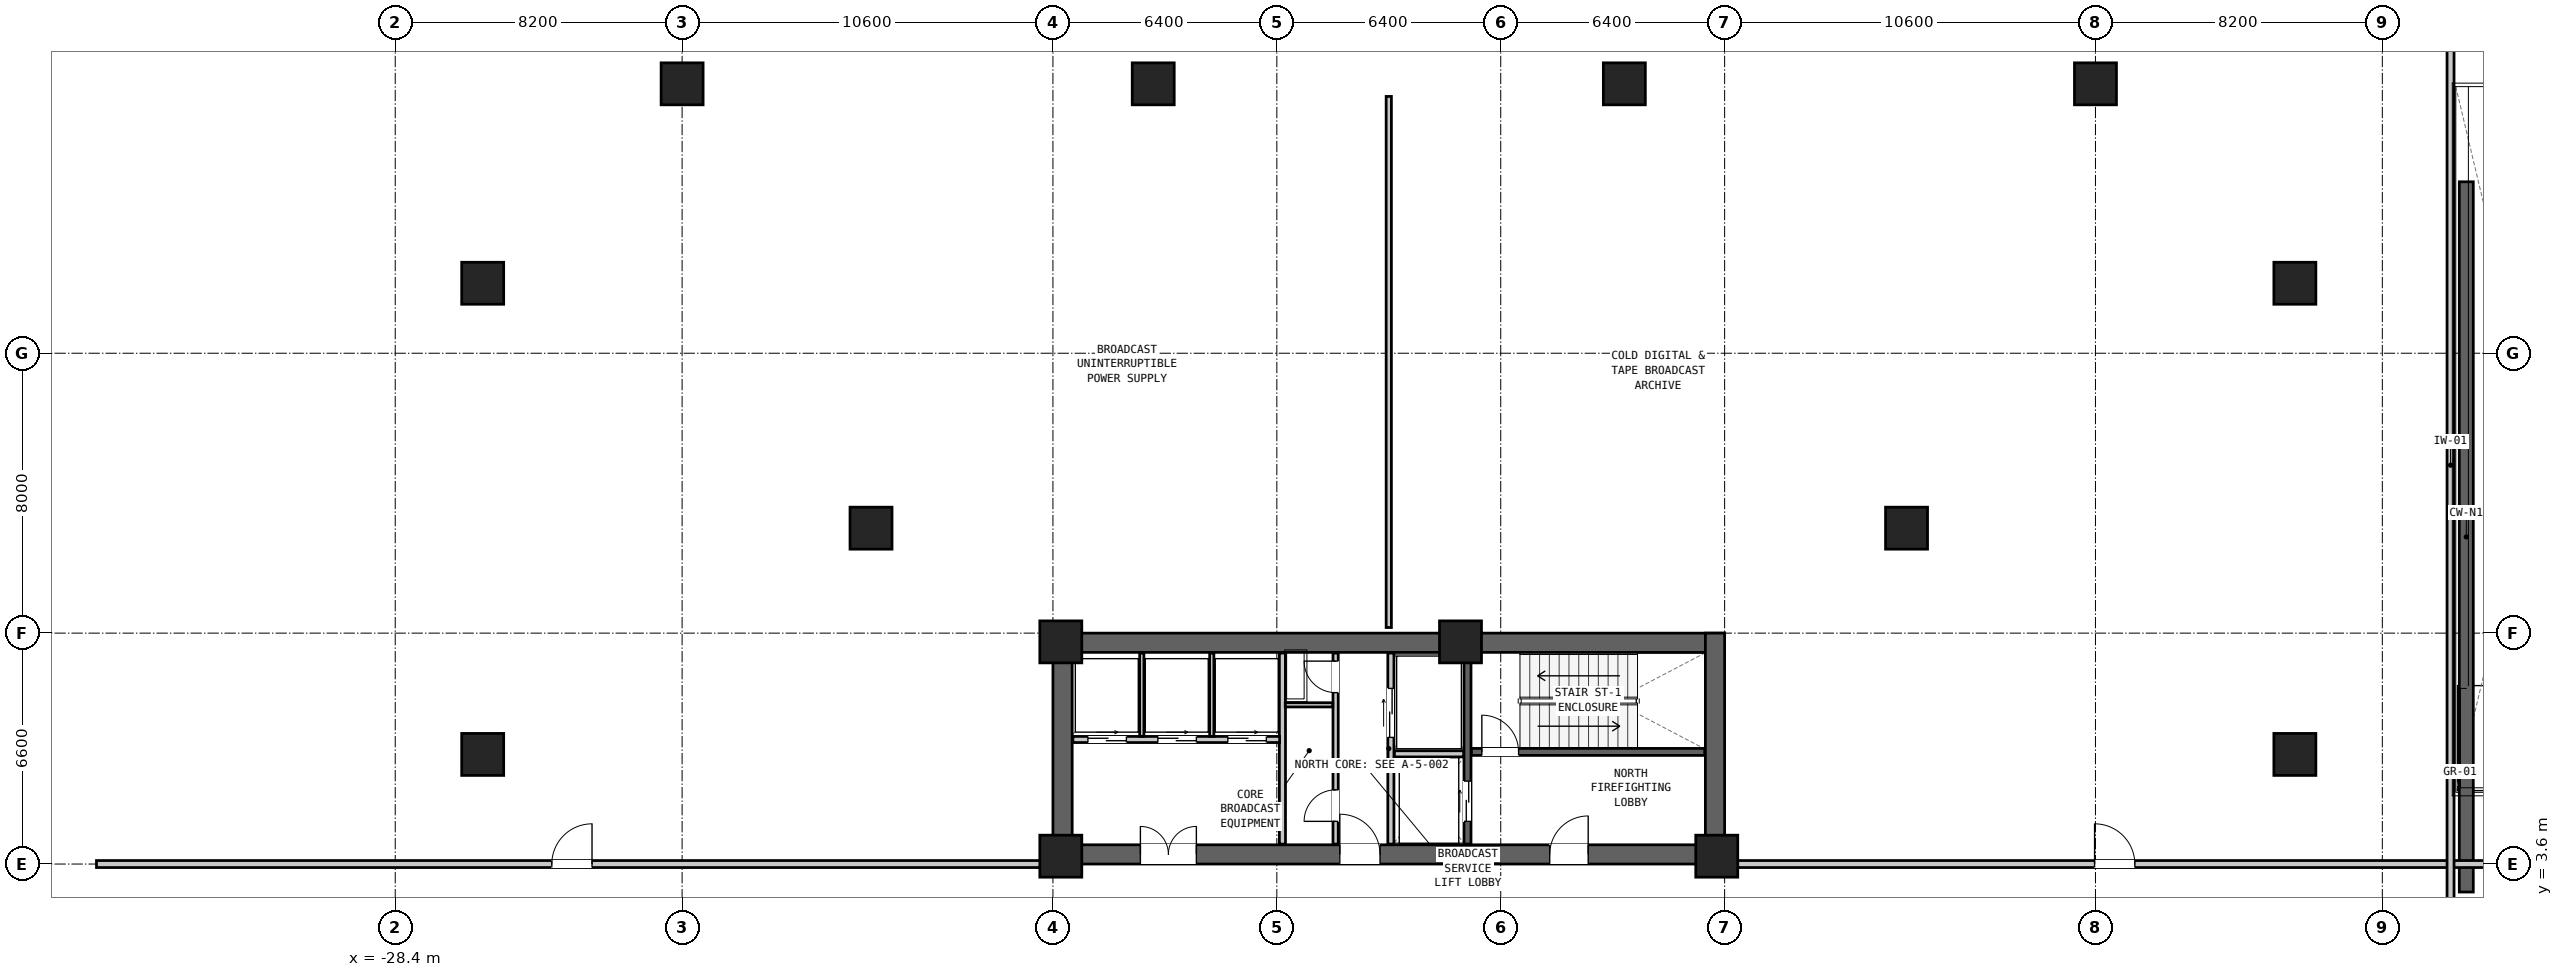
"""IFC4 building model, lengths in metres.
Left out: names, types, materials, properties, quantities, classifications, styles, units other than length and angle.
Written with IfcOpenShell. Run it as: python <this file> out.ifc"""

import sys

from ifc_helpers import new_model, si_unit, direction, frame, frame_2d, origin, origin_2d, place, context, subcontext, project, spatial, rectangle, extrude, element, fill, save


model = new_model("IFC4")
c1 = context("Model", 3, precision=1e-05, world=origin(), true_north=direction((0.0, 1.0)))
c2 = subcontext(c1, "Body", "Model", "MODEL_VIEW")
j1 = project(units=[si_unit("LENGTHUNIT", "METRE"), si_unit("PLANEANGLEUNIT", "RADIAN")], contexts=[c1])
p1 = place(None, origin())
s1 = spatial("IfcSite", under=j1, at=p1, CompositionType="ELEMENT")
p2 = place(p1, origin())
s2 = spatial("IfcBuilding", under=s1, at=p2, CompositionType="ELEMENT")
p3 = place(p2, frame((0.0, 0.0, -4.5)))
s3 = spatial("IfcBuildingStorey", under=s2, at=p3, CompositionType="ELEMENT", Elevation=-4.5)
p4 = place(p3, frame((-9.6, 9.925, 0.0), z_axis=(0.0, 0.0, 1.0), x_axis=(1.0, 0.0, 0.0)))
e1 = element("IfcWall", 1, at=p4, inside=s3, PredefinedType="SHEAR", context=c2, shape_type="SweptSolid", body=[
    extrude(rectangle(XDim=19.2, YDim=0.55, at=frame_2d((9.6, 0.0))), origin(), (0.0, 0.0, 1.0), 4.5),
])
p5 = place(p3, frame((-9.6, 3.875, 0.0), z_axis=(0.0, 0.0, 1.0), x_axis=(1.0, 0.0, 0.0)))
e2 = element("IfcWall", 2, at=p5, inside=s3, PredefinedType="SHEAR", context=c2, shape_type="SweptSolid", body=[
    extrude(rectangle(XDim=19.2, YDim=0.55, at=frame_2d((9.6, 0.0))), origin(), (0.0, 0.0, 1.0), 4.5),
])
p6 = place(p5, frame((14.2, 0.0, 0.0)))
e3 = element("IfcOpeningElement", 3, at=p6, cuts=e2, PredefinedType="OPENING", context=c2, shape_type="SweptSolid", body=[
    extrude(rectangle(XDim=1.1, YDim=2.08, at=frame_2d((0.55, 1.04))), frame((0.0, 0.287, 0.0), z_axis=(0.0, -1.0, 0.0), x_axis=(1.0, 0.0, 0.0)), (0.0, 0.0, 1.0), 0.574),
])
p7 = place(p5, frame((8.2, 0.0, 0.0)))
e4 = element("IfcOpeningElement", 4, at=p7, cuts=e2, PredefinedType="OPENING", context=c2, shape_type="SweptSolid", body=[
    extrude(rectangle(XDim=1.15, YDim=2.1, at=frame_2d((0.575, 1.05))), frame((0.0, 0.287, 0.0), z_axis=(0.0, -1.0, 0.0), x_axis=(1.0, 0.0, 0.0)), (0.0, 0.0, 1.0), 0.574),
])
p8 = place(p5, frame((2.5, 0.0, 0.0)))
e5 = element("IfcOpeningElement", 5, at=p8, cuts=e2, PredefinedType="OPENING", context=c2, shape_type="SweptSolid", body=[
    extrude(rectangle(XDim=1.6, YDim=2.12, at=frame_2d((0.8, 1.06))), frame((0.0, 0.287, 0.0), z_axis=(0.0, -1.0, 0.0), x_axis=(1.0, 0.0, 0.0)), (0.0, 0.0, 1.0), 0.574),
])
for number, where, z_axis, x_axis in (
    (6, (-9.325, 3.6, 0.0), (0.0, 0.0, 1.0), (0.0, 1.0, 0.0)),
    (7, (9.325, 3.6, 0.0), (0.0, 0.0, 1.0), (0.0, 1.0, 0.0)),
):
    element("IfcWall", number, at=place(p3, frame(where, z_axis=z_axis, x_axis=x_axis)), inside=s3, PredefinedType="SHEAR", context=c2, shape_type="SweptSolid", body=[
        extrude(rectangle(XDim=6.6, YDim=0.55, at=frame_2d((3.3, 0.0))), origin(), (0.0, 0.0, 1.0), 4.5),
    ])
for number, where, z_axis, x_axis in (
    (8, (-14.8, 13.2, 0.0), (0.0, 0.0, 1.0), (1.0, 0.0, 0.0)),
    (9, (14.8, 13.2, 0.0), (0.0, 0.0, 1.0), (1.0, 0.0, 0.0)),
    (10, (25.9, 6.733, 0.0), (0.0, 0.0, 1.0), (0.0, 1.0, 0.0)),
    (11, (25.9, 20.2, 0.0), (0.0, 0.0, 1.0), (0.0, 1.0, 0.0)),
    (12, (20.2, 25.9, 0.0), (0.0, 0.0, 1.0), (1.0, 0.0, 0.0)),
    (13, (6.733, 25.9, 0.0), (0.0, 0.0, 1.0), (1.0, 0.0, 0.0)),
    (14, (-6.733, 25.9, 0.0), (0.0, 0.0, 1.0), (1.0, 0.0, 0.0)),
    (15, (-20.2, 25.9, 0.0), (0.0, 0.0, 1.0), (1.0, 0.0, 0.0)),
    (16, (-25.9, 20.2, 0.0), (0.0, 0.0, 1.0), (0.0, 1.0, 0.0)),
    (17, (-25.9, 6.733, 0.0), (0.0, 0.0, 1.0), (0.0, 1.0, 0.0)),
    (18, (-9.375, 9.95, 0.0), (0.0, 0.0, 1.0), (1.0, 0.0, 0.0)),
    (19, (2.05, 9.95, 0.0), (0.0, 0.0, 1.0), (1.0, 0.0, 0.0)),
    (20, (-9.375, 3.825, 0.0), (0.0, 0.0, 1.0), (1.0, 0.0, 0.0)),
    (21, (9.375, 3.825, 0.0), (0.0, 0.0, 1.0), (1.0, 0.0, 0.0)),
):
    element("IfcColumn", number, at=place(p3, frame(where, z_axis=z_axis, x_axis=x_axis)), inside=s3, PredefinedType="COLUMN", context=c2, shape_type="SweptSolid", body=[
        extrude(rectangle(XDim=1.2, YDim=1.2, at=origin_2d()), origin(), (0.0, 0.0, 1.0), 4.5),
    ])
p9 = place(p3, frame((30.8, 2.8, 0.0), z_axis=(0.0, 0.0, 1.0), x_axis=(0.0, 1.0, 0.0)))
e22 = element("IfcWall", 22, at=p9, inside=s3, PredefinedType="SHEAR", context=c2, shape_type="SweptSolid", body=[
    extrude(rectangle(XDim=20.3, YDim=0.4, at=frame_2d((10.15, 0.0))), origin(), (0.0, 0.0, 1.0), 4.18),
])
p10 = place(p3, frame((2.36, 6.805, 0.0), z_axis=(0.0, 0.0, 1.0), x_axis=(1.0, 0.0, 0.0)))
e23 = element("IfcWall", 23, at=p10, inside=s3, PredefinedType="SHEAR", context=c2, shape_type="SweptSolid", body=[
    extrude(rectangle(XDim=6.67, YDim=0.2, at=frame_2d((3.335, 0.0))), origin(), (0.0, 0.0, 1.0), 4.18),
])
p11 = place(p10, frame((0.3, 0.0, 0.0)))
e24 = element("IfcOpeningElement", 24, at=p11, cuts=e23, PredefinedType="OPENING", context=c2, shape_type="SweptSolid", body=[
    extrude(rectangle(XDim=1.05, YDim=2.08, at=frame_2d((0.525, 1.04))), frame((0.0, 0.112, 0.0), z_axis=(0.0, -1.0, 0.0), x_axis=(1.0, 0.0, 0.0)), (0.0, 0.0, 1.0), 0.224),
])
p12 = place(p3, frame((2.25, 4.17, 0.0), z_axis=(0.0, 0.0, 1.0), x_axis=(0.0, 1.0, 0.0)))
e25 = element("IfcWall", 25, at=p12, inside=s3, PredefinedType="SHEAR", context=c2, shape_type="SweptSolid", body=[
    extrude(rectangle(XDim=5.46, YDim=0.2, at=frame_2d((2.73, 0.0))), origin(), (0.0, 0.0, 1.0), 4.18),
])
p13 = place(p12, frame((0.65, 0.0, 0.0)))
e26 = element("IfcOpeningElement", 26, at=p13, cuts=e25, PredefinedType="OPENING", context=c2, shape_type="SweptSolid", body=[
    extrude(rectangle(XDim=1.15, YDim=2.08, at=frame_2d((0.575, 1.04))), frame((0.0, 0.112, 0.0), z_axis=(0.0, -1.0, 0.0), x_axis=(1.0, 0.0, 0.0)), (0.0, 0.0, 1.0), 0.224),
])
p14 = place(p3, frame((0.06, 4.17, 0.0), z_axis=(0.0, 0.0, 1.0), x_axis=(0.0, 1.0, 0.0)))
e27 = element("IfcWall", 27, at=p14, inside=s3, PredefinedType="PARTITIONING", context=c2, shape_type="SweptSolid", body=[
    extrude(rectangle(XDim=5.46, YDim=0.175, at=frame_2d((2.73, 0.0))), origin(), (0.0, 0.0, 1.0), 4.18),
])
p15 = place(p14, frame((3.05, 0.0, 0.0)))
e28 = element("IfcOpeningElement", 28, at=p15, cuts=e27, PredefinedType="OPENING", context=c2, shape_type="SweptSolid", body=[
    extrude(rectangle(XDim=1.4, YDim=2.12, at=frame_2d((0.7, 1.06))), frame((0.0, 0.1, 0.0), z_axis=(0.0, -1.0, 0.0), x_axis=(1.0, 0.0, 0.0)), (0.0, 0.0, 1.0), 0.199),
])
p16 = place(p3, frame((0.16, 6.75, 0.0), z_axis=(0.0, 0.0, 1.0), x_axis=(1.0, 0.0, 0.0)))
e29 = element("IfcWall", 29, at=p16, inside=s3, PredefinedType="PARTITIONING", context=c2, shape_type="SweptSolid", body=[
    extrude(rectangle(XDim=1.98, YDim=0.175, at=frame_2d((0.99, 0.0))), origin(), (0.0, 0.0, 1.0), 4.18),
])
p17 = place(p3, frame((-3.04, 4.17, 0.0), z_axis=(0.0, 0.0, 1.0), x_axis=(0.0, 1.0, 0.0)))
e30 = element("IfcWall", 30, at=p17, inside=s3, PredefinedType="PARTITIONING", context=c2, shape_type="SweptSolid", body=[
    extrude(rectangle(XDim=5.46, YDim=0.175, at=frame_2d((2.73, 0.0))), origin(), (0.0, 0.0, 1.0), 4.18),
])
p18 = place(p3, frame((-1.52, 4.17, 0.0), z_axis=(0.0, 0.0, 1.0), x_axis=(0.0, 1.0, 0.0)))
e31 = element("IfcWall", 31, at=p18, inside=s3, PredefinedType="PARTITIONING", context=c2, shape_type="SweptSolid", body=[
    extrude(rectangle(XDim=5.46, YDim=0.15, at=frame_2d((2.73, 0.0))), origin(), (0.0, 0.0, 1.0), 4.18),
])
p19 = place(p18, frame((4.33, 0.0, 0.0)))
e32 = element("IfcOpeningElement", 32, at=p19, cuts=e31, PredefinedType="OPENING", context=c2, shape_type="SweptSolid", body=[
    extrude(rectangle(XDim=0.9, YDim=2.05, at=frame_2d((0.45, 1.025))), frame((0.0, 0.087, 0.0), z_axis=(0.0, -1.0, 0.0), x_axis=(1.0, 0.0, 0.0)), (0.0, 0.0, 1.0), 0.174),
])
p20 = place(p18, frame((0.65, 0.0, 0.0)))
e33 = element("IfcOpeningElement", 33, at=p20, cuts=e31, PredefinedType="OPENING", context=c2, shape_type="SweptSolid", body=[
    extrude(rectangle(XDim=0.9, YDim=2.05, at=frame_2d((0.45, 1.025))), frame((0.0, 0.087, 0.0), z_axis=(0.0, -1.0, 0.0), x_axis=(1.0, 0.0, 0.0)), (0.0, 0.0, 1.0), 0.174),
])
p21 = place(p3, frame((-2.96, 8.15, 0.0), z_axis=(0.0, 0.0, 1.0), x_axis=(1.0, 0.0, 0.0)))
e34 = element("IfcWall", 34, at=p21, inside=s3, PredefinedType="PARTITIONING", context=c2, shape_type="SweptSolid", body=[
    extrude(rectangle(XDim=1.36, YDim=0.12, at=frame_2d((0.68, 0.0))), origin(), (0.0, 0.0, 1.0), 4.18),
])
p22 = place(p3, frame((-9.03, 7.16, 0.0), z_axis=(0.0, 0.0, 1.0), x_axis=(1.0, 0.0, 0.0)))
e35 = element("IfcWall", 35, at=p22, inside=s3, PredefinedType="PARTITIONING", context=c2, shape_type="SweptSolid", body=[
    extrude(rectangle(XDim=5.91, YDim=0.175, at=frame_2d((2.955, 0.0))), origin(), (0.0, 0.0, 1.0), 4.18),
])
p23 = place(p22, frame((0.43, 0.0, 0.0)))
e36 = element("IfcOpeningElement", 36, at=p23, cuts=e35, PredefinedType="OPENING", context=c2, shape_type="SweptSolid", body=[
    extrude(rectangle(XDim=1.1, YDim=2.06, at=frame_2d((0.55, 1.03))), frame((0.0, 0.1, 0.0), z_axis=(0.0, -1.0, 0.0), x_axis=(1.0, 0.0, 0.0)), (0.0, 0.0, 1.0), 0.199),
])
p24 = place(p22, frame((2.43, 0.0, 0.0)))
e37 = element("IfcOpeningElement", 37, at=p24, cuts=e35, PredefinedType="OPENING", context=c2, shape_type="SweptSolid", body=[
    extrude(rectangle(XDim=1.1, YDim=2.06, at=frame_2d((0.55, 1.03))), frame((0.0, 0.1, 0.0), z_axis=(0.0, -1.0, 0.0), x_axis=(1.0, 0.0, 0.0)), (0.0, 0.0, 1.0), 0.199),
])
p25 = place(p22, frame((4.43, 0.0, 0.0)))
e38 = element("IfcOpeningElement", 38, at=p25, cuts=e35, PredefinedType="OPENING", context=c2, shape_type="SweptSolid", body=[
    extrude(rectangle(XDim=1.1, YDim=2.06, at=frame_2d((0.55, 1.03))), frame((0.0, 0.1, 0.0), z_axis=(0.0, -1.0, 0.0), x_axis=(1.0, 0.0, 0.0)), (0.0, 0.0, 1.0), 0.199),
])
for number, where, z_axis, x_axis in (
    (39, (-7.06, 7.25, 0.0), (0.0, 0.0, 1.0), (0.0, 1.0, 0.0)),
    (40, (-5.06, 7.25, 0.0), (0.0, 0.0, 1.0), (0.0, 1.0, 0.0)),
):
    element("IfcWall", number, at=place(p3, frame(where, z_axis=z_axis, x_axis=x_axis)), inside=s3, PredefinedType="PARTITIONING", context=c2, shape_type="SweptSolid", body=[
        extrude(rectangle(XDim=2.38, YDim=0.12, at=frame_2d((1.19, 0.0))), origin(), (0.0, 0.0, 1.0), 4.18),
    ])
p26 = place(p3, frame((-36.94, 3.6, 0.0), z_axis=(0.0, 0.0, 1.0), x_axis=(1.0, 0.0, 0.0)))
e41 = element("IfcWall", 41, at=p26, inside=s3, PredefinedType="PARTITIONING", context=c2, shape_type="SweptSolid", body=[
    extrude(rectangle(XDim=27.18, YDim=0.2, at=frame_2d((13.59, 0.0))), origin(), (0.0, 0.0, 1.0), 3.042),
])
p27 = place(p26, frame((13.015, 0.0, 0.0)))
e42 = element("IfcOpeningElement", 42, at=p27, cuts=e41, PredefinedType="OPENING", context=c2, shape_type="SweptSolid", body=[
    extrude(rectangle(XDim=1.15, YDim=2.1, at=frame_2d((0.575, 1.05))), frame((0.0, 0.112, 0.0), z_axis=(0.0, -1.0, 0.0), x_axis=(1.0, 0.0, 0.0)), (0.0, 0.0, 1.0), 0.224),
])
p28 = place(p3, frame((9.76, 3.6, 0.0), z_axis=(0.0, 0.0, 1.0), x_axis=(1.0, 0.0, 0.0)))
e43 = element("IfcWall", 43, at=p28, inside=s3, PredefinedType="PARTITIONING", context=c2, shape_type="SweptSolid", body=[
    extrude(rectangle(XDim=21.98, YDim=0.2, at=frame_2d((10.99, 0.0))), origin(), (0.0, 0.0, 1.0), 3.042),
])
p29 = place(p28, frame((10.415, 0.0, 0.0)))
e44 = element("IfcOpeningElement", 44, at=p29, cuts=e43, PredefinedType="OPENING", context=c2, shape_type="SweptSolid", body=[
    extrude(rectangle(XDim=1.15, YDim=2.1, at=frame_2d((0.575, 1.05))), frame((0.0, 0.112, 0.0), z_axis=(0.0, -1.0, 0.0), x_axis=(1.0, 0.0, 0.0)), (0.0, 0.0, 1.0), 0.224),
])
p30 = place(p3, frame((0.0, 10.36, 0.0), z_axis=(0.0, 0.0, 1.0), x_axis=(0.0, 1.0, 0.0)))
e45 = element("IfcWall", 45, at=p30, inside=s3, PredefinedType="PARTITIONING", context=c2, shape_type="SweptSolid", body=[
    extrude(rectangle(XDim=15.18, YDim=0.15, at=frame_2d((7.59, 0.0))), origin(), (0.0, 0.0, 1.0), 3.553),
])
p31 = place(p3, frame((30.35, 2.56, 0.0), z_axis=(0.0, 0.0, 1.0), x_axis=(0.0, 1.0, 0.0)))
e46 = element("IfcWall", 46, at=p31, inside=s3, PredefinedType="PARTITIONING", context=c2, shape_type="SweptSolid", body=[
    extrude(rectangle(XDim=24.88, YDim=0.2, at=frame_2d((12.44, 0.0))), origin(), (0.0, 0.0, 1.0), 4.18),
])
p32 = place(p11, origin())
e47 = element("IfcDoor", 47, at=p32, inside=s3, OperationType="SINGLE_SWING_LEFT", PredefinedType="DOOR", context=c2, shape_type="SweptSolid", body=[
    extrude(rectangle(XDim=1.05, YDim=2.08, at=frame_2d((0.525, 1.04))), frame((0.0, 0.025, 0.0), z_axis=(0.0, -1.0, 0.0), x_axis=(1.0, 0.0, 0.0)), (0.0, 0.0, 1.0), 0.05),
])
fill(e24, e47)
p33 = place(p6, origin())
e48 = element("IfcDoor", 48, at=p33, inside=s3, OperationType="SINGLE_SWING_RIGHT", PredefinedType="DOOR", context=c2, shape_type="SweptSolid", body=[
    extrude(rectangle(XDim=1.1, YDim=2.08, at=frame_2d((0.55, 1.04))), frame((0.0, 0.025, 0.0), z_axis=(0.0, -1.0, 0.0), x_axis=(1.0, 0.0, 0.0)), (0.0, 0.0, 1.0), 0.05),
])
fill(e3, e48)
p34 = place(p13, origin())
e49 = element("IfcDoor", 49, at=p34, inside=s3, OperationType="DOUBLE_DOOR_SLIDING", PredefinedType="DOOR", context=c2, shape_type="SweptSolid", body=[
    extrude(rectangle(XDim=1.15, YDim=2.08, at=frame_2d((0.575, 1.04))), frame((0.0, 0.025, 0.0), z_axis=(0.0, -1.0, 0.0), x_axis=(1.0, 0.0, 0.0)), (0.0, 0.0, 1.0), 0.05),
])
fill(e26, e49)
p35 = place(p15, origin())
e50 = element("IfcDoor", 50, at=p35, inside=s3, OperationType="DOUBLE_DOOR_SLIDING", PredefinedType="DOOR", context=c2, shape_type="SweptSolid", body=[
    extrude(rectangle(XDim=1.4, YDim=2.12, at=frame_2d((0.7, 1.06))), frame((0.0, 0.025, 0.0), z_axis=(0.0, -1.0, 0.0), x_axis=(1.0, 0.0, 0.0)), (0.0, 0.0, 1.0), 0.05),
])
fill(e28, e50)
p36 = place(p7, origin())
e51 = element("IfcDoor", 51, at=p36, inside=s3, OperationType="SINGLE_SWING_LEFT", PredefinedType="DOOR", context=c2, shape_type="SweptSolid", body=[
    extrude(rectangle(XDim=1.15, YDim=2.1, at=frame_2d((0.575, 1.05))), frame((0.0, 0.025, 0.0), z_axis=(0.0, -1.0, 0.0), x_axis=(1.0, 0.0, 0.0)), (0.0, 0.0, 1.0), 0.05),
])
fill(e4, e51)
p37 = place(p19, origin())
e52 = element("IfcDoor", 52, at=p37, inside=s3, OperationType="SINGLE_SWING_RIGHT", PredefinedType="DOOR", context=c2, shape_type="SweptSolid", body=[
    extrude(rectangle(XDim=0.9, YDim=2.05, at=frame_2d((0.45, 1.025))), frame((0.0, 0.025, 0.0), z_axis=(0.0, -1.0, 0.0), x_axis=(1.0, 0.0, 0.0)), (0.0, 0.0, 1.0), 0.05),
])
fill(e32, e52)
p38 = place(p20, origin())
e53 = element("IfcDoor", 53, at=p38, inside=s3, OperationType="SINGLE_SWING_LEFT", PredefinedType="DOOR", context=c2, shape_type="SweptSolid", body=[
    extrude(rectangle(XDim=0.9, YDim=2.05, at=frame_2d((0.45, 1.025))), frame((0.0, 0.025, 0.0), z_axis=(0.0, -1.0, 0.0), x_axis=(1.0, 0.0, 0.0)), (0.0, 0.0, 1.0), 0.05),
])
fill(e33, e53)
p39 = place(p23, origin())
e54 = element("IfcDoor", 54, at=p39, inside=s3, OperationType="DOUBLE_DOOR_SLIDING", PredefinedType="DOOR", context=c2, shape_type="SweptSolid", body=[
    extrude(rectangle(XDim=1.1, YDim=2.06, at=frame_2d((0.55, 1.03))), frame((0.0, 0.025, 0.0), z_axis=(0.0, -1.0, 0.0), x_axis=(1.0, 0.0, 0.0)), (0.0, 0.0, 1.0), 0.05),
])
fill(e36, e54)
p40 = place(p24, origin())
e55 = element("IfcDoor", 55, at=p40, inside=s3, OperationType="DOUBLE_DOOR_SLIDING", PredefinedType="DOOR", context=c2, shape_type="SweptSolid", body=[
    extrude(rectangle(XDim=1.1, YDim=2.06, at=frame_2d((0.55, 1.03))), frame((0.0, 0.025, 0.0), z_axis=(0.0, -1.0, 0.0), x_axis=(1.0, 0.0, 0.0)), (0.0, 0.0, 1.0), 0.05),
])
fill(e37, e55)
p41 = place(p25, origin())
e56 = element("IfcDoor", 56, at=p41, inside=s3, OperationType="DOUBLE_DOOR_SLIDING", PredefinedType="DOOR", context=c2, shape_type="SweptSolid", body=[
    extrude(rectangle(XDim=1.1, YDim=2.06, at=frame_2d((0.55, 1.03))), frame((0.0, 0.025, 0.0), z_axis=(0.0, -1.0, 0.0), x_axis=(1.0, 0.0, 0.0)), (0.0, 0.0, 1.0), 0.05),
])
fill(e38, e56)
p42 = place(p8, origin())
e57 = element("IfcDoor", 57, at=p42, inside=s3, OperationType="DOUBLE_DOOR_SINGLE_SWING", PredefinedType="DOOR", context=c2, shape_type="SweptSolid", body=[
    extrude(rectangle(XDim=1.6, YDim=2.12, at=frame_2d((0.8, 1.06))), frame((0.0, 0.025, 0.0), z_axis=(0.0, -1.0, 0.0), x_axis=(1.0, 0.0, 0.0)), (0.0, 0.0, 1.0), 0.05),
])
fill(e5, e57)
p43 = place(p27, origin())
e58 = element("IfcDoor", 58, at=p43, inside=s3, OperationType="SINGLE_SWING_RIGHT", PredefinedType="DOOR", context=c2, shape_type="SweptSolid", body=[
    extrude(rectangle(XDim=1.15, YDim=2.1, at=frame_2d((0.575, 1.05))), frame((0.0, 0.025, 0.0), z_axis=(0.0, -1.0, 0.0), x_axis=(1.0, 0.0, 0.0)), (0.0, 0.0, 1.0), 0.05),
])
fill(e42, e58)
p44 = place(p29, origin())
e59 = element("IfcDoor", 59, at=p44, inside=s3, OperationType="SINGLE_SWING_LEFT", PredefinedType="DOOR", context=c2, shape_type="SweptSolid", body=[
    extrude(rectangle(XDim=1.15, YDim=2.1, at=frame_2d((0.575, 1.05))), frame((0.0, 0.025, 0.0), z_axis=(0.0, -1.0, 0.0), x_axis=(1.0, 0.0, 0.0)), (0.0, 0.0, 1.0), 0.05),
])
fill(e44, e59)
save(model, sys.argv[1])
